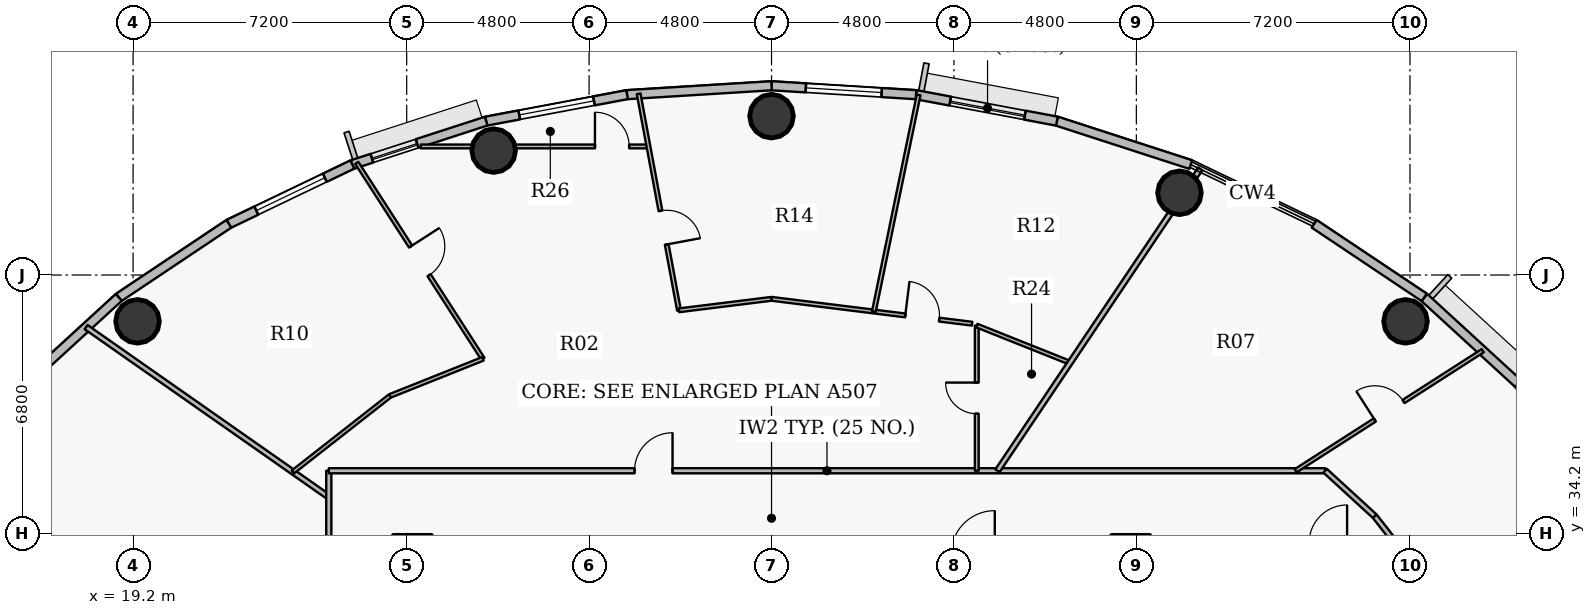
"""IFC4 building model, lengths in metres.
Left out: names, types, materials, properties, quantities, classifications, styles, units other than length and angle.
Written with IfcOpenShell. Run it as: python <this file> out.ifc"""

import sys

from ifc_helpers import new_model, si_unit, direction, frame, frame_2d, origin, origin_2d, place, context, subcontext, project, spatial, rectangle, hollow_circle, extrude, source, transform, mapped, element, fill, save


model = new_model("IFC4")
c1 = context("Model", 3, precision=1e-05, world=origin(), true_north=direction((0.0, 1.0)))
c2 = subcontext(c1, "Body", "Model", "MODEL_VIEW")
j1 = project(units=[si_unit("LENGTHUNIT", "METRE"), si_unit("PLANEANGLEUNIT", "RADIAN")], contexts=[c1])
p1 = place(None, origin())
s1 = spatial("IfcSite", under=j1, at=p1, CompositionType="ELEMENT")
p2 = place(p1, origin())
s2 = spatial("IfcBuilding", under=s1, at=p2, CompositionType="ELEMENT")
p3 = place(p2, frame((0.0, 0.0, 255.3)))
s3 = spatial("IfcBuildingStorey", under=s2, at=p3, CompositionType="ELEMENT", Elevation=255.3)
for number, where, z_axis, x_axis in (
    (1, (52.683, 39.781, 0.0), (0.0, 0.0, 1.0), (1.0, 0.0, 0.0)),
    (2, (46.735, 43.164, 0.0), (0.0, 0.0, 1.0), (1.0, 0.0, 0.0)),
    (3, (36.0, 45.18, 0.0), (0.0, 0.0, 1.0), (1.0, 0.0, 0.0)),
    (4, (28.688, 44.273, 0.0), (0.0, 0.0, 1.0), (1.0, 0.0, 0.0)),
    (5, (19.317, 39.781, 0.0), (0.0, 0.0, 1.0), (1.0, 0.0, 0.0)),
):
    element("IfcColumn", number, at=place(p3, frame(where, z_axis=z_axis, x_axis=x_axis)), inside=s3, PredefinedType="COLUMN", context=c2, shape_type="SweptSolid", body=[
        extrude(hollow_circle(Radius=0.575, WallThickness=0.036, at=origin_2d()), origin(), (0.0, 0.0, 1.0), 3.75),
    ])
p4 = place(p3, frame((55.648, 38.145, 0.0), z_axis=(0.0, 0.0, 1.0), x_axis=(0.616312344705, -0.787501805562, 0.0)))
e6 = element("IfcWall", 6, at=p4, inside=s3, PredefinedType="SOLIDWALL", context=c2, shape_type="SweptSolid", body=[
    extrude(rectangle(XDim=3.225, YDim=0.24, at=frame_2d((1.612, 0.0))), origin(), (0.0, 0.0, 1.0), 3.5),
])
p5 = place(p4, frame((0.812, 0.0, 0.9)))
e7 = element("IfcOpeningElement", 7, at=p5, cuts=e6, PredefinedType="OPENING", context=c2, shape_type="SweptSolid", body=[
    extrude(rectangle(XDim=1.6, YDim=1.75, at=origin_2d()), frame((0.8, 0.13, 0.875), z_axis=(0.0, -1.0, 0.0), x_axis=(1.0, 0.0, 0.0)), (0.0, 0.0, 1.0), 0.26),
])
p6 = place(p3, frame((53.176, 40.411, 0.0), z_axis=(0.0, 0.0, 1.0), x_axis=(0.737123922599, -0.675757591694, 0.0)))
e8 = element("IfcWall", 8, at=p6, inside=s3, PredefinedType="SOLIDWALL", context=c2, shape_type="SweptSolid", body=[
    extrude(rectangle(XDim=3.354, YDim=0.24, at=frame_2d((1.677, 0.0))), origin(), (0.0, 0.0, 1.0), 3.5),
])
p7 = place(p3, frame((50.28, 42.348, 0.0), z_axis=(0.0, 0.0, 1.0), x_axis=(0.831262496074, -0.555880079352, 0.0)))
e9 = element("IfcWall", 9, at=p7, inside=s3, PredefinedType="SOLIDWALL", context=c2, shape_type="SweptSolid", body=[
    extrude(rectangle(XDim=3.484, YDim=0.24, at=frame_2d((1.742, 0.0))), origin(), (0.0, 0.0, 1.0), 3.5),
])
p8 = place(p3, frame((43.509, 45.049, 0.0), z_axis=(0.0, 0.0, 1.0), x_axis=(0.951210789182, -0.308541787354, 0.0)))
e10 = element("IfcWall", 10, at=p8, inside=s3, PredefinedType="SOLIDWALL", context=c2, shape_type="SweptSolid", body=[
    extrude(rectangle(XDim=3.702, YDim=0.24, at=frame_2d((1.851, 0.0))), origin(), (0.0, 0.0, 1.0), 3.5),
])
p9 = place(p3, frame((39.802, 45.746, 0.0), z_axis=(0.0, 0.0, 1.0), x_axis=(0.982784898575, -0.184753465822, 0.0)))
e11 = element("IfcWall", 11, at=p9, inside=s3, PredefinedType="SOLIDWALL", context=c2, shape_type="SweptSolid", body=[
    extrude(rectangle(XDim=3.773, YDim=0.24, at=frame_2d((1.886, 0.0))), origin(), (0.0, 0.0, 1.0), 3.5),
])
p10 = place(p9, frame((0.916, 0.0, 0.9)))
e12 = element("IfcOpeningElement", 12, at=p10, cuts=e11, PredefinedType="OPENING", context=c2, shape_type="SweptSolid", body=[
    extrude(rectangle(XDim=2.0, YDim=1.75, at=origin_2d()), frame((1.0, 0.13, 0.875), z_axis=(0.0, -1.0, 0.0), x_axis=(1.0, 0.0, 0.0)), (0.0, 0.0, 1.0), 0.26),
])
p11 = place(p3, frame((36.0, 45.98, 0.0), z_axis=(0.0, 0.0, 1.0), x_axis=(0.998108785312, -0.06147237333, 0.0)))
e13 = element("IfcWall", 13, at=p11, inside=s3, PredefinedType="SOLIDWALL", context=c2, shape_type="SweptSolid", body=[
    extrude(rectangle(XDim=3.809, YDim=0.24, at=frame_2d((1.904, 0.0))), origin(), (0.0, 0.0, 1.0), 3.5),
])
p12 = place(p11, frame((0.904, 0.0, 0.9)))
e14 = element("IfcOpeningElement", 14, at=p12, cuts=e13, PredefinedType="OPENING", context=c2, shape_type="SweptSolid", body=[
    extrude(rectangle(XDim=2.0, YDim=1.75, at=origin_2d()), frame((1.0, 0.13, 0.875), z_axis=(0.0, -1.0, 0.0), x_axis=(1.0, 0.0, 0.0)), (0.0, 0.0, 1.0), 0.26),
])
p13 = place(p3, frame((32.198, 45.746, 0.0), z_axis=(0.0, 0.0, 1.0), x_axis=(0.998108785312, 0.06147237333, 0.0)))
e15 = element("IfcWall", 15, at=p13, inside=s3, PredefinedType="SOLIDWALL", context=c2, shape_type="SweptSolid", body=[
    extrude(rectangle(XDim=3.809, YDim=0.24, at=frame_2d((1.904, 0.0))), origin(), (0.0, 0.0, 1.0), 3.5),
])
p14 = place(p3, frame((28.491, 45.049, 0.0), z_axis=(0.0, 0.0, 1.0), x_axis=(0.982784898575, 0.184753465822, 0.0)))
e16 = element("IfcWall", 16, at=p14, inside=s3, PredefinedType="SOLIDWALL", context=c2, shape_type="SweptSolid", body=[
    extrude(rectangle(XDim=3.773, YDim=0.24, at=frame_2d((1.886, 0.0))), origin(), (0.0, 0.0, 1.0), 3.5),
])
p15 = place(p14, frame((0.886, 0.0, 0.9)))
e17 = element("IfcOpeningElement", 17, at=p15, cuts=e16, PredefinedType="OPENING", context=c2, shape_type="SweptSolid", body=[
    extrude(rectangle(XDim=2.0, YDim=1.75, at=origin_2d()), frame((1.0, 0.13, 0.875), z_axis=(0.0, -1.0, 0.0), x_axis=(1.0, 0.0, 0.0)), (0.0, 0.0, 1.0), 0.26),
])
p16 = place(p3, frame((24.969, 43.906, 0.0), z_axis=(0.0, 0.0, 1.0), x_axis=(0.951210789182, 0.308541787354, 0.0)))
e18 = element("IfcWall", 18, at=p16, inside=s3, PredefinedType="SOLIDWALL", context=c2, shape_type="SweptSolid", body=[
    extrude(rectangle(XDim=3.702, YDim=0.24, at=frame_2d((1.851, 0.0))), origin(), (0.0, 0.0, 1.0), 3.5),
])
p17 = place(p16, frame((0.542, 0.0, 0.9)))
e19 = element("IfcOpeningElement", 19, at=p17, cuts=e18, PredefinedType="OPENING", context=c2, shape_type="SweptSolid", body=[
    extrude(rectangle(XDim=1.25, YDim=1.65, at=origin_2d()), frame((0.625, 0.13, 0.825), z_axis=(0.0, -1.0, 0.0), x_axis=(1.0, 0.0, 0.0)), (0.0, 0.0, 1.0), 0.26),
])
p18 = place(p3, frame((21.72, 42.348, 0.0), z_axis=(0.0, 0.0, 1.0), x_axis=(0.901598104751, 0.432574684313, 0.0)))
e20 = element("IfcWall", 20, at=p18, inside=s3, PredefinedType="SOLIDWALL", context=c2, shape_type="SweptSolid", body=[
    extrude(rectangle(XDim=3.604, YDim=0.24, at=frame_2d((1.802, 0.0))), origin(), (0.0, 0.0, 1.0), 3.5),
])
p19 = place(p18, frame((0.802, 0.0, 0.9)))
e21 = element("IfcOpeningElement", 21, at=p19, cuts=e20, PredefinedType="OPENING", context=c2, shape_type="SweptSolid", body=[
    extrude(rectangle(XDim=2.0, YDim=1.75, at=origin_2d()), frame((1.0, 0.13, 0.875), z_axis=(0.0, -1.0, 0.0), x_axis=(1.0, 0.0, 0.0)), (0.0, 0.0, 1.0), 0.26),
])
p20 = place(p3, frame((18.824, 40.411, 0.0), z_axis=(0.0, 0.0, 1.0), x_axis=(0.831262496074, 0.555880079352, 0.0)))
e22 = element("IfcWall", 22, at=p20, inside=s3, PredefinedType="SOLIDWALL", context=c2, shape_type="SweptSolid", body=[
    extrude(rectangle(XDim=3.484, YDim=0.24, at=frame_2d((1.742, 0.0))), origin(), (0.0, 0.0, 1.0), 3.5),
])
p21 = place(p3, frame((16.352, 38.145, 0.0), z_axis=(0.0, 0.0, 1.0), x_axis=(0.737123922599, 0.675757591694, 0.0)))
e23 = element("IfcWall", 23, at=p21, inside=s3, PredefinedType="SOLIDWALL", context=c2, shape_type="SweptSolid", body=[
    extrude(rectangle(XDim=3.354, YDim=0.24, at=frame_2d((1.677, 0.0))), origin(), (0.0, 0.0, 1.0), 3.5),
])
p22 = place(p3, frame((17.964, 39.629, 0.0), z_axis=(0.0, 0.0, 1.0), x_axis=(0.819162769896, -0.573561118292, 0.0)))
e24 = element("IfcWall", 24, at=p22, inside=s3, PredefinedType="PARTITIONING", context=c2, shape_type="SweptSolid", body=[
    extrude(rectangle(XDim=7.796, YDim=0.135, at=frame_2d((3.898, 0.0))), origin(), (0.0, 0.0, 1.0), 2.985),
])
p23 = place(p3, frame((23.406, 35.819, 0.0), z_axis=(0.0, 0.0, 1.0), x_axis=(0.787387506959, 0.616458363465, 0.0)))
e25 = element("IfcWall", 25, at=p23, inside=s3, PredefinedType="PARTITIONING", context=c2, shape_type="SweptSolid", body=[
    extrude(rectangle(XDim=3.245, YDim=0.1, at=frame_2d((1.623, 0.0))), origin(), (0.0, 0.0, 1.0), 2.935),
])
p24 = place(p3, frame((24.35, 27.95, 0.0), z_axis=(0.0, 0.0, 1.0), x_axis=(0.0, 1.0, 0.0)))
e26 = element("IfcWall", 26, at=p24, inside=s3, PredefinedType="PARTITIONING", context=c2, shape_type="SweptSolid", body=[
    extrude(rectangle(XDim=7.9, YDim=0.135, at=frame_2d((3.95, 0.0))), origin(), (0.0, 0.0, 1.0), 2.935),
])
p25 = place(p24, frame((3.099, 0.0, 0.0)))
e27 = element("IfcOpeningElement", 27, at=p25, cuts=e26, PredefinedType="OPENING", context=c2, shape_type="SweptSolid", body=[
    extrude(rectangle(XDim=1.05, YDim=2.15, at=origin_2d()), frame((0.525, 0.078, 1.075), z_axis=(0.0, -1.0, 0.0), x_axis=(1.0, 0.0, 0.0)), (0.0, 0.0, 1.0), 0.155),
])
p26 = place(p3, frame((24.35, 35.85, 0.0), z_axis=(0.0, 0.0, 1.0), x_axis=(1.0, 0.0, 0.0)))
e28 = element("IfcWall", 28, at=p26, inside=s3, PredefinedType="PARTITIONING", context=c2, shape_type="SweptSolid", body=[
    extrude(rectangle(XDim=26.218, YDim=0.135, at=frame_2d((13.109, 0.0))), origin(), (0.0, 0.0, 1.0), 2.935),
])
p27 = place(p26, frame((8.045, 0.0, 0.0)))
e29 = element("IfcOpeningElement", 29, at=p27, cuts=e28, PredefinedType="OPENING", context=c2, shape_type="SweptSolid", body=[
    extrude(rectangle(XDim=1.0, YDim=2.15, at=origin_2d()), frame((0.5, 0.078, 1.075), z_axis=(0.0, -1.0, 0.0), x_axis=(1.0, 0.0, 0.0)), (0.0, 0.0, 1.0), 0.155),
])
p28 = place(p3, frame((25.086, 43.95, 0.0), z_axis=(0.0, 0.0, 1.0), x_axis=(0.54137931016, -0.840778474112, 0.0)))
e30 = element("IfcWall", 30, at=p28, inside=s3, PredefinedType="PARTITIONING", context=c2, shape_type="SweptSolid", body=[
    extrude(rectangle(XDim=6.131, YDim=0.1, at=frame_2d((3.066, 0.0))), origin(), (0.0, 0.0, 1.0), 2.985),
])
p29 = place(p28, frame((2.615, 0.0, 0.0)))
e31 = element("IfcOpeningElement", 31, at=p29, cuts=e30, PredefinedType="OPENING", context=c2, shape_type="SweptSolid", body=[
    extrude(rectangle(XDim=0.9, YDim=2.1, at=origin_2d()), frame((0.45, 0.06, 1.05), z_axis=(0.0, -1.0, 0.0), x_axis=(1.0, 0.0, 0.0)), (0.0, 0.0, 1.0), 0.12),
])
p30 = place(p3, frame((25.961, 37.819, 0.0), z_axis=(0.0, 0.0, 1.0), x_axis=(0.928796141516, 0.370591051572, 0.0)))
e32 = element("IfcWall", 32, at=p30, inside=s3, PredefinedType="PARTITIONING", context=c2, shape_type="SweptSolid", body=[
    extrude(rectangle(XDim=2.633, YDim=0.1, at=frame_2d((1.316, 0.0))), origin(), (0.0, 0.0, 1.0), 3.5),
])
p31 = place(p3, frame((26.772, 44.383, 0.0), z_axis=(0.0, 0.0, 1.0), x_axis=(1.0, 0.0, 0.0)))
e33 = element("IfcWall", 33, at=p31, inside=s3, PredefinedType="PARTITIONING", context=c2, shape_type="SweptSolid", body=[
    extrude(rectangle(XDim=5.99, YDim=0.1, at=frame_2d((2.995, 0.0))), origin(), (0.0, 0.0, 1.0), 2.985),
])
p32 = place(p31, frame((4.582, 0.0, 0.0)))
e34 = element("IfcOpeningElement", 34, at=p32, cuts=e33, PredefinedType="OPENING", context=c2, shape_type="SweptSolid", body=[
    extrude(rectangle(XDim=0.9, YDim=2.1, at=origin_2d()), frame((0.45, 0.06, 1.05), z_axis=(0.0, -1.0, 0.0), x_axis=(1.0, 0.0, 0.0)), (0.0, 0.0, 1.0), 0.12),
])
p33 = place(p3, frame((32.503, 45.77, 0.0), z_axis=(0.0, 0.0, 1.0), x_axis=(0.183138923076, -0.983087043376, 0.0)))
e35 = element("IfcWall", 35, at=p33, inside=s3, PredefinedType="PARTITIONING", context=c2, shape_type="SweptSolid", body=[
    extrude(rectangle(XDim=5.796, YDim=0.1, at=frame_2d((2.898, 0.0))), origin(), (0.0, 0.0, 1.0), 2.985),
])
p34 = place(p33, frame((3.133, 0.0, 0.0)))
e36 = element("IfcOpeningElement", 36, at=p34, cuts=e35, PredefinedType="OPENING", context=c2, shape_type="SweptSolid", body=[
    extrude(rectangle(XDim=0.9, YDim=2.1, at=origin_2d()), frame((0.45, 0.06, 1.05), z_axis=(0.0, -1.0, 0.0), x_axis=(1.0, 0.0, 0.0)), (0.0, 0.0, 1.0), 0.12),
])
p35 = place(p3, frame((33.565, 40.072, 0.0), z_axis=(0.0, 0.0, 1.0), x_axis=(0.992396815028, 0.1230794927, 0.0)))
e37 = element("IfcWall", 37, at=p35, inside=s3, PredefinedType="PARTITIONING", context=c2, shape_type="SweptSolid", body=[
    extrude(rectangle(XDim=2.454, YDim=0.1, at=frame_2d((1.227, 0.0))), origin(), (0.0, 0.0, 1.0), 2.935),
])
p36 = place(p3, frame((36.0, 40.374, 0.0), z_axis=(0.0, 0.0, 1.0), x_axis=(0.992398169186, -0.123068573551, 0.0)))
e38 = element("IfcWall", 38, at=p36, inside=s3, PredefinedType="PARTITIONING", context=c2, shape_type="SweptSolid", body=[
    extrude(rectangle(XDim=5.319, YDim=0.1, at=frame_2d((2.659, 0.0))), origin(), (0.0, 0.0, 1.0), 2.935),
])
p37 = place(p36, frame((3.546, 0.0, 0.0)))
e39 = element("IfcOpeningElement", 39, at=p37, cuts=e38, PredefinedType="OPENING", context=c2, shape_type="SweptSolid", body=[
    extrude(rectangle(XDim=0.9, YDim=2.1, at=origin_2d()), frame((0.45, 0.06, 1.05), z_axis=(0.0, -1.0, 0.0), x_axis=(1.0, 0.0, 0.0)), (0.0, 0.0, 1.0), 0.12),
])
p38 = place(p3, frame((38.694, 40.04, 0.0), z_axis=(0.0, 0.0, 1.0), x_axis=(0.20228508648, 0.979326678789, 0.0)))
e40 = element("IfcWall", 40, at=p38, inside=s3, PredefinedType="PARTITIONING", context=c2, shape_type="SweptSolid", body=[
    extrude(rectangle(XDim=5.819, YDim=0.1, at=frame_2d((2.909, 0.0))), origin(), (0.0, 0.0, 1.0), 2.985),
])
p39 = place(p3, frame((41.401, 35.85, 0.0), z_axis=(0.0, 0.0, 1.0), x_axis=(0.0, 1.0, 0.0)))
e41 = element("IfcWall", 41, at=p39, inside=s3, PredefinedType="PARTITIONING", context=c2, shape_type="SweptSolid", body=[
    extrude(rectangle(XDim=3.82, YDim=0.1, at=frame_2d((1.91, 0.0))), origin(), (0.0, 0.0, 1.0), 3.5),
])
p40 = place(p39, frame((1.5, 0.0, 0.0)))
e42 = element("IfcOpeningElement", 42, at=p40, cuts=e41, PredefinedType="OPENING", context=c2, shape_type="SweptSolid", body=[
    extrude(rectangle(XDim=0.82, YDim=2.1, at=origin_2d()), frame((0.41, 0.06, 1.05), z_axis=(0.0, -1.0, 0.0), x_axis=(1.0, 0.0, 0.0)), (0.0, 0.0, 1.0), 0.12),
])
p41 = place(p3, frame((41.401, 39.67, 0.0), z_axis=(0.0, 0.0, 1.0), x_axis=(0.92880772077, -0.370562029677, 0.0)))
e43 = element("IfcWall", 43, at=p41, inside=s3, PredefinedType="PARTITIONING", context=c2, shape_type="SweptSolid", body=[
    extrude(rectangle(XDim=2.642, YDim=0.1, at=frame_2d((1.321, 0.0))), origin(), (0.0, 0.0, 1.0), 2.935),
])
p42 = place(p3, frame((41.946, 35.85, 0.0), z_axis=(0.0, 0.0, 1.0), x_axis=(0.557670345873, 0.830062518931, 0.0)))
e44 = element("IfcWall", 44, at=p42, inside=s3, PredefinedType="PARTITIONING", context=c2, shape_type="SweptSolid", body=[
    extrude(rectangle(XDim=9.568, YDim=0.135, at=frame_2d((4.784, 0.0))), origin(), (0.0, 0.0, 1.0), 2.935),
])
p43 = place(p3, frame((49.792, 35.85, 0.0), z_axis=(0.0, 0.0, 1.0), x_axis=(0.841640734873, 0.540037844416, 0.0)))
e45 = element("IfcWall", 45, at=p43, inside=s3, PredefinedType="PARTITIONING", context=c2, shape_type="SweptSolid", body=[
    extrude(rectangle(XDim=5.848, YDim=0.1, at=frame_2d((2.924, 0.0))), origin(), (0.0, 0.0, 1.0), 2.985),
])
p44 = place(p43, frame((2.474, 0.0, 0.0)))
e46 = element("IfcOpeningElement", 46, at=p44, cuts=e45, PredefinedType="OPENING", context=c2, shape_type="SweptSolid", body=[
    extrude(rectangle(XDim=0.9, YDim=2.1, at=origin_2d()), frame((0.45, 0.06, 1.05), z_axis=(0.0, -1.0, 0.0), x_axis=(1.0, 0.0, 0.0)), (0.0, 0.0, 1.0), 0.12),
])
p45 = place(p3, frame((50.568, 35.85, 0.0), z_axis=(0.0, 0.0, 1.0), x_axis=(0.737102657331, -0.675780787353, 0.0)))
e47 = element("IfcWall", 47, at=p45, inside=s3, PredefinedType="PARTITIONING", context=c2, shape_type="SweptSolid", body=[
    extrude(rectangle(XDim=1.772, YDim=0.135, at=frame_2d((0.886, 0.0))), origin(), (0.0, 0.0, 1.0), 3.5),
])
p46 = place(p3, frame((51.874, 34.653, 0.0), z_axis=(0.0, 0.0, 1.0), x_axis=(0.61628613448, -0.787522317429, 0.0)))
e48 = element("IfcWall", 48, at=p46, inside=s3, PredefinedType="PARTITIONING", context=c2, shape_type="SweptSolid", body=[
    extrude(rectangle(XDim=0.893, YDim=0.135, at=frame_2d((0.446, 0.0))), origin(), (0.0, 0.0, 1.0), 3.5),
])
m1 = source(origin(), c2, "Body", "SweptSolid", [
    extrude(rectangle(XDim=2.0, YDim=1.75, at=origin_2d()), frame((1.0, 0.03, 0.875), z_axis=(0.0, -1.0, 0.0), x_axis=(1.0, 0.0, 0.0)), (0.0, 0.0, 1.0), 0.06),
])
p47 = place(p10, origin())
e49 = element("IfcWindow", 49, at=p47, inside=s3, PartitioningType="DOUBLE_PANEL_VERTICAL", PredefinedType="WINDOW", context=c2, shape_type="MappedRepresentation", body=[
    mapped(m1, transform((0.0, 0.0, 0.0), x_axis=(1.0, 0.0, 0.0), y_axis=(0.0, 1.0, 0.0), z_axis=(0.0, 0.0, 1.0), scale=1.0)),
])
fill(e12, e49)
p48 = place(p12, origin())
e50 = element("IfcWindow", 50, at=p48, inside=s3, PartitioningType="DOUBLE_PANEL_VERTICAL", PredefinedType="WINDOW", context=c2, shape_type="MappedRepresentation", body=[
    mapped(m1, transform((0.0, 0.0, 0.0), x_axis=(1.0, 0.0, 0.0), y_axis=(0.0, 1.0, 0.0), z_axis=(0.0, 0.0, 1.0), scale=1.0)),
])
fill(e14, e50)
p49 = place(p15, origin())
e51 = element("IfcWindow", 51, at=p49, inside=s3, PartitioningType="DOUBLE_PANEL_VERTICAL", PredefinedType="WINDOW", context=c2, shape_type="MappedRepresentation", body=[
    mapped(m1, transform((0.0, 0.0, 0.0), x_axis=(1.0, 0.0, 0.0), y_axis=(0.0, 1.0, 0.0), z_axis=(0.0, 0.0, 1.0), scale=1.0)),
])
fill(e17, e51)
p50 = place(p19, origin())
e52 = element("IfcWindow", 52, at=p50, inside=s3, PartitioningType="DOUBLE_PANEL_VERTICAL", PredefinedType="WINDOW", context=c2, shape_type="MappedRepresentation", body=[
    mapped(m1, transform((0.0, 0.0, 0.0), x_axis=(1.0, 0.0, 0.0), y_axis=(0.0, 1.0, 0.0), z_axis=(0.0, 0.0, 1.0), scale=1.0)),
])
fill(e21, e52)
m2 = source(origin(), c2, "Body", "SweptSolid", [
    extrude(rectangle(XDim=1.25, YDim=1.65, at=origin_2d()), frame((0.625, 0.03, 0.825), z_axis=(0.0, -1.0, 0.0), x_axis=(1.0, 0.0, 0.0)), (0.0, 0.0, 1.0), 0.06),
])
p51 = place(p17, origin())
e53 = element("IfcWindow", 53, at=p51, inside=s3, PartitioningType="SINGLE_PANEL", PredefinedType="WINDOW", context=c2, shape_type="MappedRepresentation", body=[
    mapped(m2, transform((0.0, 0.0, 0.0), x_axis=(1.0, 0.0, 0.0), y_axis=(0.0, 1.0, 0.0), z_axis=(0.0, 0.0, 1.0), scale=1.0)),
])
fill(e19, e53)
m3 = source(origin(), c2, "Body", "SweptSolid", [
    extrude(rectangle(XDim=0.9, YDim=2.1, at=origin_2d()), frame((0.45, 0.025, 1.05), z_axis=(0.0, -1.0, 0.0), x_axis=(1.0, 0.0, 0.0)), (0.0, 0.0, 1.0), 0.05),
])
p52 = place(p44, origin())
e54 = element("IfcDoor", 54, at=p52, inside=s3, OperationType="SINGLE_SWING_LEFT", PredefinedType="DOOR", context=c2, shape_type="MappedRepresentation", body=[
    mapped(m3, transform((0.0, 0.0, 0.0), x_axis=(1.0, 0.0, 0.0), y_axis=(0.0, 1.0, 0.0), z_axis=(0.0, 0.0, 1.0), scale=1.0)),
])
fill(e46, e54)
m4 = source(origin(), c2, "Body", "SweptSolid", [
    extrude(rectangle(XDim=1.0, YDim=2.15, at=origin_2d()), frame((0.5, 0.025, 1.075), z_axis=(0.0, -1.0, 0.0), x_axis=(1.0, 0.0, 0.0)), (0.0, 0.0, 1.0), 0.05),
])
p53 = place(p27, origin())
e55 = element("IfcDoor", 55, at=p53, inside=s3, OperationType="SINGLE_SWING_RIGHT", PredefinedType="DOOR", context=c2, shape_type="MappedRepresentation", body=[
    mapped(m4, transform((0.0, 0.0, 0.0), x_axis=(1.0, 0.0, 0.0), y_axis=(0.0, 1.0, 0.0), z_axis=(0.0, 0.0, 1.0), scale=1.0)),
])
fill(e29, e55)
p54 = place(p37, origin())
e56 = element("IfcDoor", 56, at=p54, inside=s3, OperationType="SINGLE_SWING_LEFT", PredefinedType="DOOR", context=c2, shape_type="MappedRepresentation", body=[
    mapped(m3, transform((0.0, 0.0, 0.0), x_axis=(1.0, 0.0, 0.0), y_axis=(0.0, 1.0, 0.0), z_axis=(0.0, 0.0, 1.0), scale=1.0)),
])
fill(e39, e56)
p55 = place(p34, origin())
e57 = element("IfcDoor", 57, at=p55, inside=s3, OperationType="SINGLE_SWING_RIGHT", PredefinedType="DOOR", context=c2, shape_type="MappedRepresentation", body=[
    mapped(m3, transform((0.0, 0.0, 0.0), x_axis=(1.0, 0.0, 0.0), y_axis=(0.0, 1.0, 0.0), z_axis=(0.0, 0.0, 1.0), scale=1.0)),
])
fill(e36, e57)
p56 = place(p29, origin())
e58 = element("IfcDoor", 58, at=p56, inside=s3, OperationType="SINGLE_SWING_LEFT", PredefinedType="DOOR", context=c2, shape_type="MappedRepresentation", body=[
    mapped(m3, transform((0.0, 0.0, 0.0), x_axis=(1.0, 0.0, 0.0), y_axis=(0.0, 1.0, 0.0), z_axis=(0.0, 0.0, 1.0), scale=1.0)),
])
fill(e31, e58)
m5 = source(origin(), c2, "Body", "SweptSolid", [
    extrude(rectangle(XDim=0.82, YDim=2.1, at=origin_2d()), frame((0.41, 0.025, 1.05), z_axis=(0.0, -1.0, 0.0), x_axis=(1.0, 0.0, 0.0)), (0.0, 0.0, 1.0), 0.05),
])
p57 = place(p40, origin())
e59 = element("IfcDoor", 59, at=p57, inside=s3, OperationType="SINGLE_SWING_RIGHT", PredefinedType="DOOR", context=c2, shape_type="MappedRepresentation", body=[
    mapped(m5, transform((0.0, 0.0, 0.0), x_axis=(1.0, 0.0, 0.0), y_axis=(0.0, 1.0, 0.0), z_axis=(0.0, 0.0, 1.0), scale=1.0)),
])
fill(e42, e59)
p58 = place(p32, origin())
e60 = element("IfcDoor", 60, at=p58, inside=s3, OperationType="SINGLE_SWING_LEFT", PredefinedType="DOOR", context=c2, shape_type="MappedRepresentation", body=[
    mapped(m3, transform((0.0, 0.0, 0.0), x_axis=(1.0, 0.0, 0.0), y_axis=(0.0, 1.0, 0.0), z_axis=(0.0, 0.0, 1.0), scale=1.0)),
])
fill(e34, e60)
save(model, sys.argv[1])
